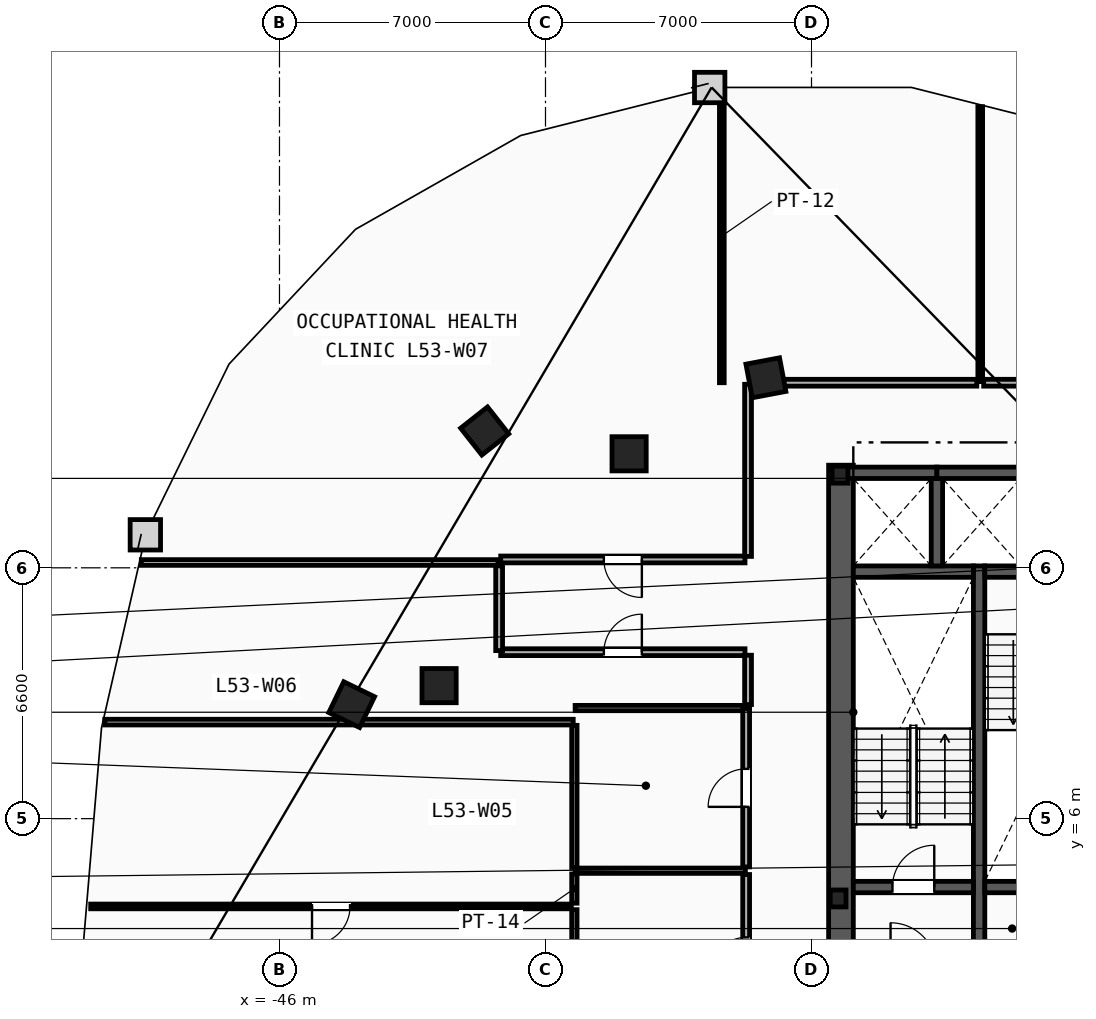
"""IFC4 building model, lengths in metres.
Left out: names, types, materials, properties, quantities, classifications, styles, units other than length and angle.
Written with IfcOpenShell. Run it as: python <this file> out.ifc"""

import sys

from ifc_helpers import new_model, si_unit, direction, frame, frame_2d, origin, origin_2d, place, context, subcontext, project, spatial, rectangle, i_section, extrude, element, fill, save


model = new_model("IFC4")
c1 = context("Model", 3, precision=1e-05, world=origin(), true_north=direction((0.0, 1.0)))
c2 = subcontext(c1, "Body", "Model", "MODEL_VIEW")
j1 = project(units=[si_unit("LENGTHUNIT", "METRE"), si_unit("PLANEANGLEUNIT", "RADIAN")], contexts=[c1])
p1 = place(None, origin())
s1 = spatial("IfcSite", under=j1, at=p1, CompositionType="ELEMENT")
p2 = place(p1, origin())
s2 = spatial("IfcBuilding", under=s1, at=p2, CompositionType="ELEMENT")
p3 = place(p2, frame((0.0, 0.0, 202.6)))
s3 = spatial("IfcBuildingStorey", under=s2, at=p3, CompositionType="ELEMENT", Elevation=202.6)
for number, where, z_axis, x_axis in (
    (1, (-31.3, 3.9, 0.0), (0.0, 0.0, 1.0), (1.0, 0.0, 0.0)),
    (2, (-31.25, 15.05, 0.0), (0.0, 0.0, 1.0), (1.0, 0.0, 0.0)),
):
    element("IfcColumn", number, at=place(p3, frame(where, z_axis=z_axis, x_axis=x_axis)), inside=s3, PredefinedType="COLUMN", context=c2, shape_type="SweptSolid", body=[
        extrude(i_section(OverallWidth=0.416, OverallDepth=0.446, WebThickness=0.039, FlangeThickness=0.063, FilletRadius=0.018, at=origin_2d()), origin(), (0.0, 0.0, 1.0), 3.6),
    ])
for number, where, z_axis, x_axis in (
    (3, (-41.8, 9.5, 0.0), (0.0, 0.0, 1.0), (1.0, 0.0, 0.0)),
    (4, (-36.8, 15.6, 0.0), (0.0, 0.0, 1.0), (1.0, 0.0, 0.0)),
    (5, (-33.2, 17.6, 0.0), (0.0, 0.0, 1.0), (-0.983, -0.186, 0.0)),
    (6, (-40.6, 16.2, 0.0), (0.0, 0.0, 1.0), (-0.785, -0.619, 0.0)),
    (7, (-44.1, 9.0, 0.0), (0.0, 0.0, 1.0), (-0.437, -0.899, 0.0)),
):
    element("IfcColumn", number, at=place(p3, frame(where, z_axis=z_axis, x_axis=x_axis)), inside=s3, PredefinedType="COLUMN", context=c2, shape_type="SweptSolid", body=[
        extrude(rectangle(XDim=0.9, YDim=0.9, at=origin_2d()), origin(), (0.0, 0.0, 1.0), 3.6),
    ])
p4 = place(p3, frame((-31.225, 1.97, 0.0), z_axis=(0.0, 0.0, 1.0), x_axis=(0.0, 1.0, 0.0)))
e8 = element("IfcWall", 8, at=p4, inside=s3, PredefinedType="SHEAR", context=c2, shape_type="SweptSolid", body=[
    extrude(rectangle(XDim=13.33, YDim=0.65, at=frame_2d((6.665, 0.0))), origin(), (0.0, 0.0, 1.0), 3.34),
])
p5 = place(p3, frame((-27.59, 1.97, 0.0), z_axis=(0.0, 0.0, 1.0), x_axis=(0.0, 1.0, 0.0)))
e9 = element("IfcWall", 9, at=p5, inside=s3, PredefinedType="SHEAR", context=c2, shape_type="SweptSolid", body=[
    extrude(rectangle(XDim=10.68, YDim=0.3, at=frame_2d((5.34, 0.0))), origin(), (0.0, 0.0, 1.0), 3.34),
])
p6 = place(p3, frame((-30.9, 4.2, 0.0), z_axis=(0.0, 0.0, 1.0), x_axis=(1.0, 0.0, 0.0)))
e10 = element("IfcWall", 10, at=p6, inside=s3, PredefinedType="SHEAR", context=c2, shape_type="SweptSolid", body=[
    extrude(rectangle(XDim=3.16, YDim=0.3, at=frame_2d((1.58, 0.0))), origin(), (0.0, 0.0, 1.0), 3.34),
])
p7 = place(p6, frame((1.03, 0.0, 0.0)))
e11 = element("IfcOpeningElement", 11, at=p7, cuts=e10, PredefinedType="OPENING", context=c2, shape_type="SweptSolid", body=[
    extrude(rectangle(XDim=1.1, YDim=2.15, at=frame_2d((0.55, 1.075))), frame((0.0, 0.16, 0.0), z_axis=(0.0, -1.0, 0.0), x_axis=(1.0, 0.0, 0.0)), (0.0, 0.0, 1.0), 0.32),
])
p8 = place(p3, frame((-30.9, 12.5, 0.0), z_axis=(0.0, 0.0, 1.0), x_axis=(1.0, 0.0, 0.0)))
e12 = element("IfcWall", 12, at=p8, inside=s3, PredefinedType="SHEAR", context=c2, shape_type="SweptSolid", body=[
    extrude(rectangle(XDim=3.16, YDim=0.3, at=frame_2d((1.58, 0.0))), origin(), (0.0, 0.0, 1.0), 3.34),
])
p9 = place(p3, frame((-27.44, 12.5, 0.0), z_axis=(0.0, 0.0, 1.0), x_axis=(1.0, 0.0, 0.0)))
e13 = element("IfcWall", 13, at=p9, inside=s3, PredefinedType="SHEAR", context=c2, shape_type="SweptSolid", body=[
    extrude(rectangle(XDim=3.16, YDim=0.3, at=frame_2d((1.58, 0.0))), origin(), (0.0, 0.0, 1.0), 3.34),
])
p10 = place(p9, frame((1.03, 0.0, 0.0)))
e14 = element("IfcOpeningElement", 14, at=p10, cuts=e13, PredefinedType="OPENING", context=c2, shape_type="SweptSolid", body=[
    extrude(rectangle(XDim=1.1, YDim=2.15, at=frame_2d((0.55, 1.075))), frame((0.0, 0.16, 0.0), z_axis=(0.0, -1.0, 0.0), x_axis=(1.0, 0.0, 0.0)), (0.0, 0.0, 1.0), 0.32),
])
p11 = place(p3, frame((-27.44, 4.2, 0.0), z_axis=(0.0, 0.0, 1.0), x_axis=(1.0, 0.0, 0.0)))
e15 = element("IfcWall", 15, at=p11, inside=s3, PredefinedType="SHEAR", context=c2, shape_type="SweptSolid", body=[
    extrude(rectangle(XDim=3.16, YDim=0.3, at=frame_2d((1.58, 0.0))), origin(), (0.0, 0.0, 1.0), 3.34),
])
p12 = place(p3, frame((-31.2, 15.1, 0.0), z_axis=(0.0, 0.0, 1.0), x_axis=(1.0, 0.0, 0.0)))
e16 = element("IfcWall", 16, at=p12, inside=s3, PredefinedType="SHEAR", context=c2, shape_type="SweptSolid", body=[
    extrude(rectangle(XDim=2.5, YDim=0.3, at=frame_2d((1.25, 0.0))), origin(), (0.0, 0.0, 1.0), 3.34),
])
p13 = place(p3, frame((-28.7, 12.65, 0.0), z_axis=(0.0, 0.0, 1.0), x_axis=(0.0, 1.0, 0.0)))
e17 = element("IfcWall", 17, at=p13, inside=s3, PredefinedType="SHEAR", context=c2, shape_type="SweptSolid", body=[
    extrude(rectangle(XDim=2.3, YDim=0.3, at=frame_2d((1.15, 0.0))), origin(), (0.0, 0.0, 1.0), 3.34),
])
p14 = place(p3, frame((-28.7, 15.1, 0.0), z_axis=(0.0, 0.0, 1.0), x_axis=(1.0, 0.0, 0.0)))
e18 = element("IfcWall", 18, at=p14, inside=s3, PredefinedType="SHEAR", context=c2, shape_type="SweptSolid", body=[
    extrude(rectangle(XDim=2.5, YDim=0.3, at=frame_2d((1.25, 0.0))), origin(), (0.0, 0.0, 1.0), 3.34),
])
p15 = place(p3, frame((-38.24, 0.27, 0.0), z_axis=(0.0, 0.0, 1.0), x_axis=(0.0, 1.0, 0.0)))
e19 = element("IfcWall", 19, at=p15, inside=s3, PredefinedType="PARTITIONING", context=c2, shape_type="SweptSolid", body=[
    extrude(rectangle(XDim=3.335, YDim=0.14, at=frame_2d((1.667, 0.0))), origin(), (0.0, 0.0, 1.0), 3.34),
])
p16 = place(p3, frame((-38.24, 3.775, 0.0), z_axis=(0.0, 0.0, 1.0), x_axis=(0.0, 1.0, 0.0)))
e20 = element("IfcWall", 20, at=p16, inside=s3, PredefinedType="PARTITIONING", context=c2, shape_type="SweptSolid", body=[
    extrude(rectangle(XDim=0.77, YDim=0.14, at=frame_2d((0.385, 0.0))), origin(), (0.0, 0.0, 1.0), 3.34),
])
p17 = place(p3, frame((-38.24, 4.715, 0.0), z_axis=(0.0, 0.0, 1.0), x_axis=(0.0, 1.0, 0.0)))
e21 = element("IfcWall", 21, at=p17, inside=s3, PredefinedType="PARTITIONING", context=c2, shape_type="SweptSolid", body=[
    extrude(rectangle(XDim=3.74, YDim=0.14, at=frame_2d((1.87, 0.0))), origin(), (0.0, 0.0, 1.0), 3.34),
])
for number, where, z_axis, x_axis in (
    (22, (-38.22, 4.63, 0.0), (0.0, 0.0, 1.0), (1.0, 0.0, 0.0)),
    (23, (-38.22, 8.91, 0.0), (0.0, 0.0, 1.0), (1.0, 0.0, 0.0)),
):
    element("IfcWall", number, at=place(p3, frame(where, z_axis=z_axis, x_axis=x_axis)), inside=s3, PredefinedType="PARTITIONING", context=c2, shape_type="SweptSolid", body=[
        extrude(rectangle(XDim=4.48, YDim=0.14, at=frame_2d((2.24, 0.0))), origin(), (0.0, 0.0, 1.0), 3.34),
    ])
p18 = place(p3, frame((-33.72, 0.27, 0.0), z_axis=(0.0, 0.0, 1.0), x_axis=(0.0, 1.0, 0.0)))
e24 = element("IfcWall", 24, at=p18, inside=s3, PredefinedType="PARTITIONING", context=c2, shape_type="SweptSolid", body=[
    extrude(rectangle(XDim=4.26, YDim=0.18, at=frame_2d((2.13, 0.0))), origin(), (0.0, 0.0, 1.0), 3.34),
])
p19 = place(p18, frame((1.655, 0.0, 0.0)))
e25 = element("IfcOpeningElement", 25, at=p19, cuts=e24, PredefinedType="OPENING", context=c2, shape_type="SweptSolid", body=[
    extrude(rectangle(XDim=0.95, YDim=2.1, at=frame_2d((0.475, 1.05))), frame((0.0, 0.1, 0.0), z_axis=(0.0, -1.0, 0.0), x_axis=(1.0, 0.0, 0.0)), (0.0, 0.0, 1.0), 0.2),
])
p20 = place(p3, frame((-33.72, 4.73, 0.0), z_axis=(0.0, 0.0, 1.0), x_axis=(0.0, 1.0, 0.0)))
e26 = element("IfcWall", 26, at=p20, inside=s3, PredefinedType="PARTITIONING", context=c2, shape_type="SweptSolid", body=[
    extrude(rectangle(XDim=4.16, YDim=0.18, at=frame_2d((2.08, 0.0))), origin(), (0.0, 0.0, 1.0), 3.34),
])
p21 = place(p20, frame((1.58, 0.0, 0.0)))
e27 = element("IfcOpeningElement", 27, at=p21, cuts=e26, PredefinedType="OPENING", context=c2, shape_type="SweptSolid", body=[
    extrude(rectangle(XDim=1.0, YDim=2.15, at=frame_2d((0.5, 1.075))), frame((0.0, 0.1, 0.0), z_axis=(0.0, -1.0, 0.0), x_axis=(1.0, 0.0, 0.0)), (0.0, 0.0, 1.0), 0.2),
])
p22 = place(p3, frame((-50.598, 8.54, 0.0), z_axis=(0.0, 0.0, 1.0), x_axis=(1.0, 0.0, 0.0)))
e28 = element("IfcWall", 28, at=p22, inside=s3, PredefinedType="PARTITIONING", context=c2, shape_type="SweptSolid", body=[
    extrude(rectangle(XDim=12.328, YDim=0.15, at=frame_2d((6.164, 0.0))), origin(), (0.0, 0.0, 1.0), 3.34),
])
p23 = place(p3, frame((-49.635, 12.74, 0.0), z_axis=(0.0, 0.0, 1.0), x_axis=(1.0, 0.0, 0.0)))
e29 = element("IfcWall", 29, at=p23, inside=s3, PredefinedType="PARTITIONING", context=c2, shape_type="SweptSolid", body=[
    extrude(rectangle(XDim=9.385, YDim=0.15, at=frame_2d((4.693, 0.0))), origin(), (0.0, 0.0, 1.0), 3.34),
])
p24 = place(p3, frame((-34.36, 17.47, 0.0), z_axis=(0.0, 0.0, 1.0), x_axis=(0.0, 1.0, 0.0)))
e30 = element("IfcWall", 30, at=p24, inside=s3, PredefinedType="PARTITIONING", context=c2, shape_type="SweptSolid", body=[
    extrude(rectangle(XDim=7.72, YDim=0.125, at=frame_2d((3.86, 0.0))), origin(), (0.0, 0.0, 1.0), 3.34),
])
p25 = place(p3, frame((-27.56, 17.5, 0.0), z_axis=(0.0, 0.0, 1.0), x_axis=(0.0, 1.0, 0.0)))
e31 = element("IfcWall", 31, at=p25, inside=s3, PredefinedType="PARTITIONING", context=c2, shape_type="SweptSolid", body=[
    extrude(rectangle(XDim=7.233, YDim=0.125, at=frame_2d((3.617, 0.0))), origin(), (0.0, 0.0, 1.0), 3.34),
])
p26 = place(p3, frame((-16.822, 17.47, 0.0), z_axis=(0.0, 0.0, 1.0), x_axis=(-1.0, 0.0, 0.0)))
e32 = element("IfcWall", 32, at=p26, inside=s3, PredefinedType="PARTITIONING", context=c2, shape_type="SweptSolid", body=[
    extrude(rectangle(XDim=10.648, YDim=0.18, at=frame_2d((5.324, 0.0))), origin(), (0.0, 0.0, 1.0), 3.34),
])
p27 = place(p26, frame((4.824, 0.0, 0.0)))
e33 = element("IfcOpeningElement", 33, at=p27, cuts=e32, PredefinedType="OPENING", context=c2, shape_type="SweptSolid", body=[
    extrude(rectangle(XDim=1.0, YDim=2.15, at=frame_2d((0.5, 1.075))), frame((0.0, 0.1, 0.0), z_axis=(0.0, -1.0, 0.0), x_axis=(1.0, 0.0, 0.0)), (0.0, 0.0, 1.0), 0.2),
])
p28 = place(p3, frame((-40.178, 10.38, 0.0), z_axis=(0.0, 0.0, 1.0), x_axis=(1.0, 0.0, 0.0)))
e34 = element("IfcWall", 34, at=p28, inside=s3, PredefinedType="PARTITIONING", context=c2, shape_type="SweptSolid", body=[
    extrude(rectangle(XDim=6.428, YDim=0.18, at=frame_2d((3.214, 0.0))), origin(), (0.0, 0.0, 1.0), 3.34),
])
p29 = place(p28, frame((2.714, 0.0, 0.0)))
e35 = element("IfcOpeningElement", 35, at=p29, cuts=e34, PredefinedType="OPENING", context=c2, shape_type="SweptSolid", body=[
    extrude(rectangle(XDim=1.0, YDim=2.15, at=frame_2d((0.5, 1.075))), frame((0.0, 0.1, 0.0), z_axis=(0.0, -1.0, 0.0), x_axis=(1.0, 0.0, 0.0)), (0.0, 0.0, 1.0), 0.2),
])
p30 = place(p3, frame((-40.22, 12.65, 0.0), z_axis=(0.0, 0.0, 1.0), x_axis=(0.0, -1.0, 0.0)))
e36 = element("IfcWall", 36, at=p30, inside=s3, PredefinedType="PARTITIONING", context=c2, shape_type="SweptSolid", body=[
    extrude(rectangle(XDim=2.229, YDim=0.18, at=frame_2d((1.114, 0.0))), origin(), (0.0, 0.0, 1.0), 3.34),
])
p31 = place(p3, frame((-33.67, 10.3, 0.0), z_axis=(0.0, 0.0, 1.0), x_axis=(0.0, -1.0, 0.0)))
e37 = element("IfcWall", 37, at=p31, inside=s3, PredefinedType="PARTITIONING", context=c2, shape_type="SweptSolid", body=[
    extrude(rectangle(XDim=1.299, YDim=0.18, at=frame_2d((0.649, 0.0))), origin(), (0.0, 0.0, 1.0), 3.34),
])
p32 = place(p3, frame((-33.75, 12.82, 0.0), z_axis=(0.0, 0.0, 1.0), x_axis=(-1.0, 0.0, 0.0)))
e38 = element("IfcWall", 38, at=p32, inside=s3, PredefinedType="PARTITIONING", context=c2, shape_type="SweptSolid", body=[
    extrude(rectangle(XDim=6.428, YDim=0.18, at=frame_2d((3.214, 0.0))), origin(), (0.0, 0.0, 1.0), 3.34),
])
p33 = place(p32, frame((2.714, 0.0, 0.0)))
e39 = element("IfcOpeningElement", 39, at=p33, cuts=e38, PredefinedType="OPENING", context=c2, shape_type="SweptSolid", body=[
    extrude(rectangle(XDim=1.0, YDim=2.15, at=frame_2d((0.5, 1.075))), frame((0.0, 0.1, 0.0), z_axis=(0.0, -1.0, 0.0), x_axis=(1.0, 0.0, 0.0)), (0.0, 0.0, 1.0), 0.2),
])
p34 = place(p3, frame((-27.65, 17.47, 0.0), z_axis=(0.0, 0.0, 1.0), x_axis=(-1.0, 0.0, 0.0)))
e40 = element("IfcWall", 40, at=p34, inside=s3, PredefinedType="PARTITIONING", context=c2, shape_type="SweptSolid", body=[
    extrude(rectangle(XDim=5.979, YDim=0.18, at=frame_2d((2.989, 0.0))), origin(), (0.0, 0.0, 1.0), 3.34),
])
p35 = place(p3, frame((-33.67, 17.428, 0.0), z_axis=(0.0, 0.0, 1.0), x_axis=(0.0, -1.0, 0.0)))
e41 = element("IfcWall", 41, at=p35, inside=s3, PredefinedType="PARTITIONING", context=c2, shape_type="SweptSolid", body=[
    extrude(rectangle(XDim=4.529, YDim=0.18, at=frame_2d((2.264, 0.0))), origin(), (0.0, 0.0, 1.0), 3.34),
])
p36 = place(p3, frame((-38.32, 3.69, 0.0), z_axis=(0.0, 0.0, 1.0), x_axis=(-1.0, 0.0, 0.0)))
e42 = element("IfcWall", 42, at=p36, inside=s3, PredefinedType="PARTITIONING", context=c2, shape_type="SweptSolid", body=[
    extrude(rectangle(XDim=12.647, YDim=0.125, at=frame_2d((6.324, 0.0))), origin(), (0.0, 0.0, 1.0), 3.34),
])
p37 = place(p36, frame((5.824, 0.0, 0.0)))
e43 = element("IfcOpeningElement", 43, at=p37, cuts=e42, PredefinedType="OPENING", context=c2, shape_type="SweptSolid", body=[
    extrude(rectangle(XDim=1.0, YDim=2.15, at=frame_2d((0.5, 1.075))), frame((0.0, 0.073, 0.0), z_axis=(0.0, -1.0, 0.0), x_axis=(1.0, 0.0, 0.0)), (0.0, 0.0, 1.0), 0.145),
])
p38 = place(p7, origin())
e44 = element("IfcDoor", 44, at=p38, inside=s3, OperationType="SINGLE_SWING_RIGHT", PredefinedType="DOOR", context=c2, shape_type="SweptSolid", body=[
    extrude(rectangle(XDim=1.1, YDim=2.15, at=frame_2d((0.55, 1.075))), frame((0.0, 0.025, 0.0), z_axis=(0.0, -1.0, 0.0), x_axis=(1.0, 0.0, 0.0)), (0.0, 0.0, 1.0), 0.05),
])
fill(e11, e44)
p39 = place(p37, origin())
e45 = element("IfcDoor", 45, at=p39, inside=s3, OperationType="SINGLE_SWING_RIGHT", PredefinedType="DOOR", context=c2, shape_type="SweptSolid", body=[
    extrude(rectangle(XDim=1.0, YDim=2.15, at=frame_2d((0.5, 1.075))), frame((0.0, 0.025, 0.0), z_axis=(0.0, -1.0, 0.0), x_axis=(1.0, 0.0, 0.0)), (0.0, 0.0, 1.0), 0.05),
])
fill(e43, e45)
p40 = place(p29, origin())
e46 = element("IfcDoor", 46, at=p40, inside=s3, OperationType="SINGLE_SWING_RIGHT", PredefinedType="DOOR", context=c2, shape_type="SweptSolid", body=[
    extrude(rectangle(XDim=1.0, YDim=2.15, at=frame_2d((0.5, 1.075))), frame((0.0, 0.025, 0.0), z_axis=(0.0, -1.0, 0.0), x_axis=(1.0, 0.0, 0.0)), (0.0, 0.0, 1.0), 0.05),
])
fill(e35, e46)
p41 = place(p33, origin())
e47 = element("IfcDoor", 47, at=p41, inside=s3, OperationType="SINGLE_SWING_LEFT", PredefinedType="DOOR", context=c2, shape_type="SweptSolid", body=[
    extrude(rectangle(XDim=1.0, YDim=2.15, at=frame_2d((0.5, 1.075))), frame((0.0, 0.025, 0.0), z_axis=(0.0, -1.0, 0.0), x_axis=(1.0, 0.0, 0.0)), (0.0, 0.0, 1.0), 0.05),
])
fill(e39, e47)
p42 = place(p19, origin())
e48 = element("IfcDoor", 48, at=p42, inside=s3, OperationType="SINGLE_SWING_LEFT", PredefinedType="DOOR", context=c2, shape_type="SweptSolid", body=[
    extrude(rectangle(XDim=0.95, YDim=2.1, at=frame_2d((0.475, 1.05))), frame((0.0, 0.025, 0.0), z_axis=(0.0, -1.0, 0.0), x_axis=(1.0, 0.0, 0.0)), (0.0, 0.0, 1.0), 0.05),
])
fill(e25, e48)
p43 = place(p21, origin())
e49 = element("IfcDoor", 49, at=p43, inside=s3, OperationType="SINGLE_SWING_LEFT", PredefinedType="DOOR", context=c2, shape_type="SweptSolid", body=[
    extrude(rectangle(XDim=1.0, YDim=2.15, at=frame_2d((0.5, 1.075))), frame((0.0, 0.025, 0.0), z_axis=(0.0, -1.0, 0.0), x_axis=(1.0, 0.0, 0.0)), (0.0, 0.0, 1.0), 0.05),
])
fill(e27, e49)
save(model, sys.argv[1])
